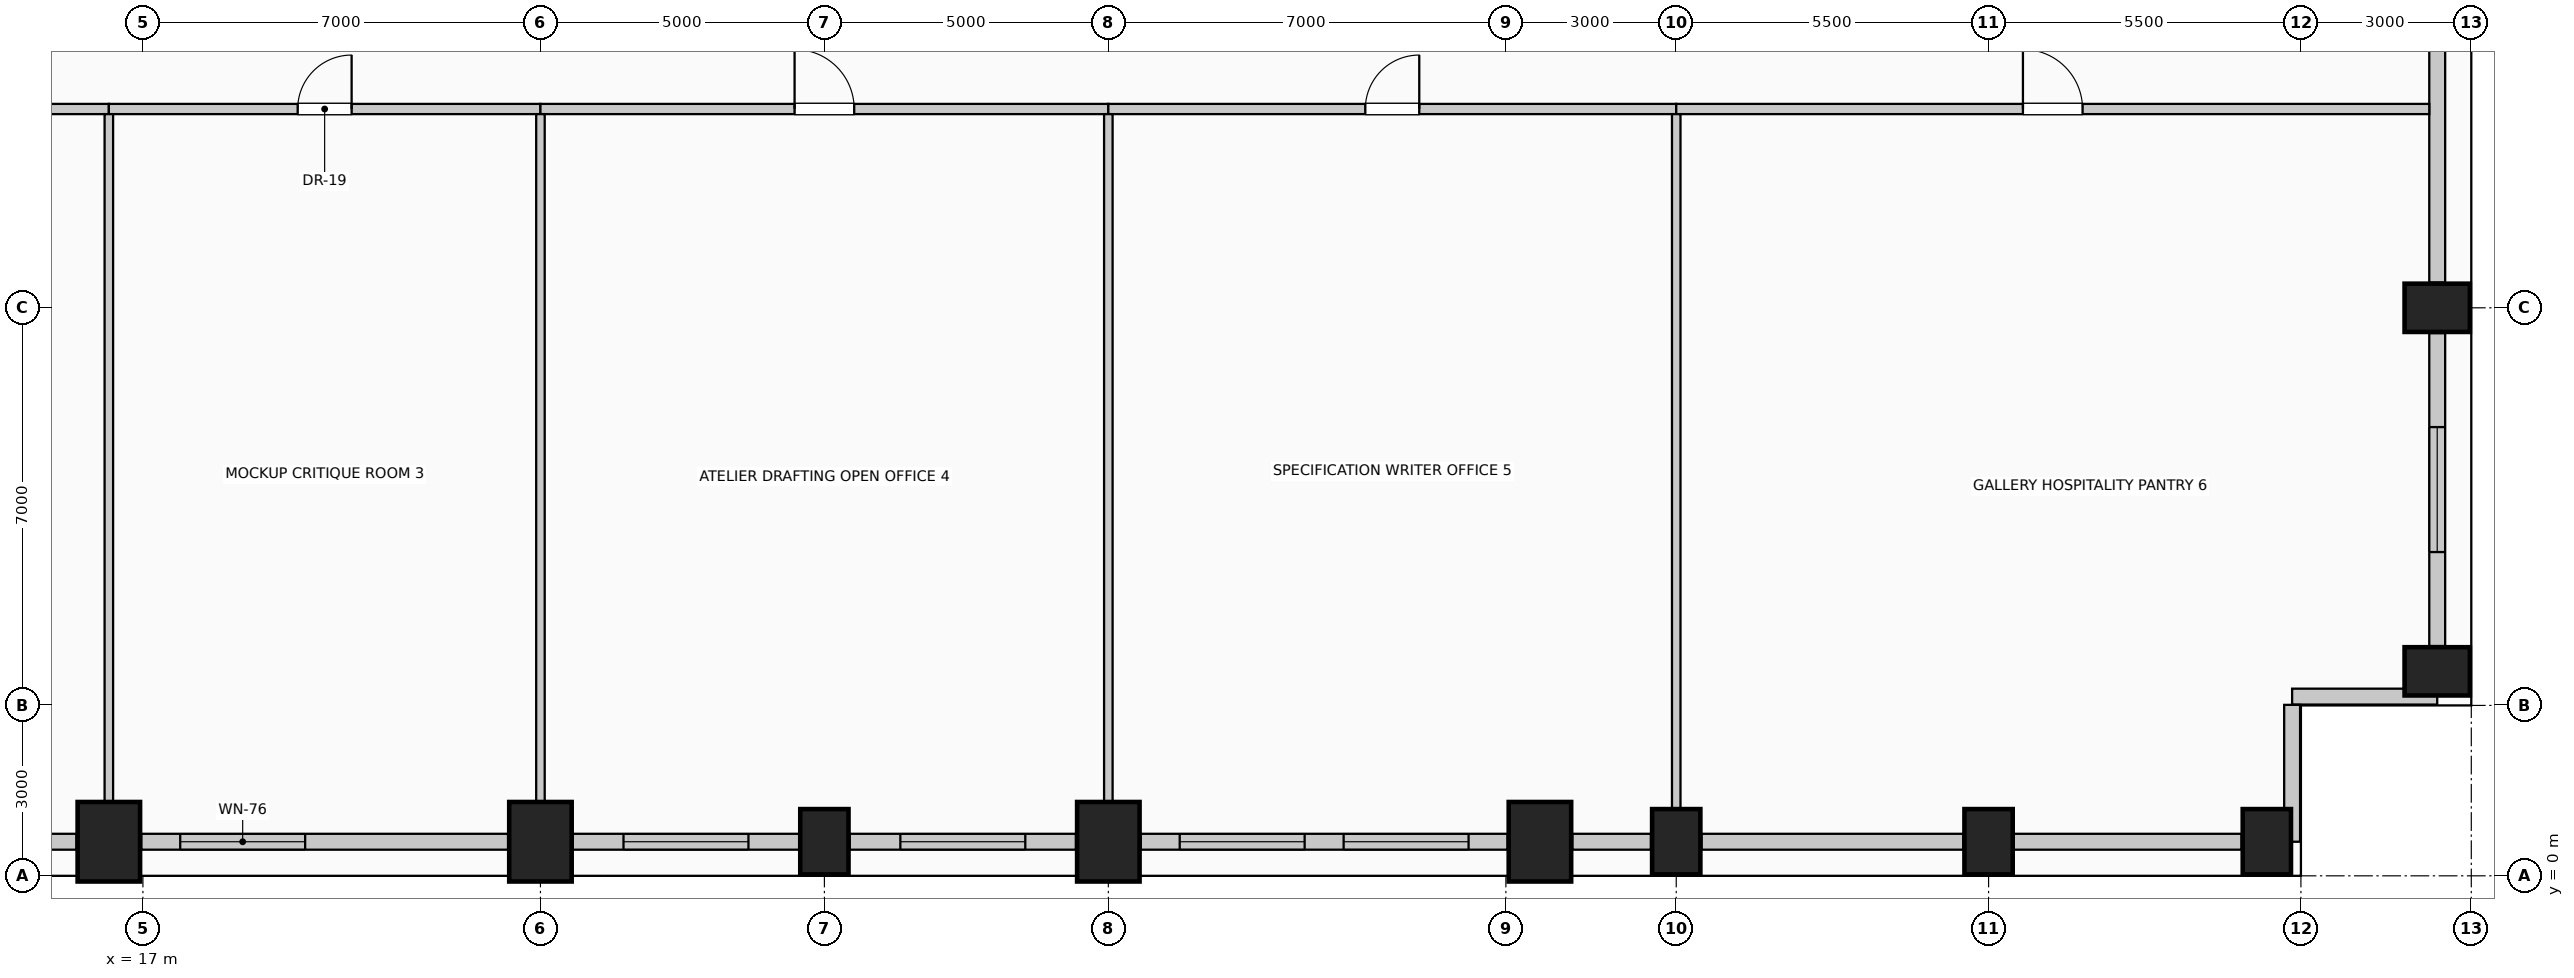
"""IFC4 building model, lengths in metres.
Left out: names, types, materials, properties, quantities, classifications, styles, units other than length and angle.
Written with IfcOpenShell. Run it as: python <this file> out.ifc"""

import sys

from ifc_helpers import new_model, si_unit, direction, frame, frame_2d, origin, origin_2d, place, context, subcontext, project, spatial, rectangle, extrude, element, fill, save


model = new_model("IFC4")
c1 = context("Model", 3, precision=1e-05, world=origin(), true_north=direction((0.0, 1.0)))
c2 = subcontext(c1, "Body", "Model", "MODEL_VIEW")
j1 = project(units=[si_unit("LENGTHUNIT", "METRE"), si_unit("PLANEANGLEUNIT", "RADIAN")], contexts=[c1])
p1 = place(None, origin())
s1 = spatial("IfcSite", under=j1, at=p1, CompositionType="ELEMENT")
p2 = place(p1, origin())
s2 = spatial("IfcBuilding", under=s1, at=p2, CompositionType="ELEMENT")
p3 = place(p2, frame((0.0, 0.0, 132.6)))
s3 = spatial("IfcBuildingStorey", under=s2, at=p3, CompositionType="ELEMENT", Elevation=132.6)
for number, where, z_axis, x_axis in (
    (1, (16.4, 0.6, 0.0), (0.0, 0.0, 1.0), (1.0, 0.0, 0.0)),
    (2, (24.0, 0.6, 0.0), (0.0, 0.0, 1.0), (1.0, 0.0, 0.0)),
):
    element("IfcColumn", number, at=place(p3, frame(where, z_axis=z_axis, x_axis=x_axis)), inside=s3, PredefinedType="COLUMN", context=c2, shape_type="SweptSolid", body=[
        extrude(rectangle(XDim=1.1, YDim=1.4, at=origin_2d()), origin(), (0.0, 0.0, 1.0), 4.0),
    ])
p4 = place(p3, frame((29.0, 0.6, 0.0), z_axis=(0.0, 0.0, 1.0), x_axis=(1.0, 0.0, 0.0)))
e3 = element("IfcColumn", 3, at=p4, inside=s3, PredefinedType="COLUMN", context=c2, shape_type="SweptSolid", body=[
    extrude(rectangle(XDim=0.85, YDim=1.15, at=origin_2d()), origin(), (0.0, 0.0, 1.0), 4.0),
])
for number, where, z_axis, x_axis in (
    (4, (34.0, 0.6, 0.0), (0.0, 0.0, 1.0), (1.0, 0.0, 0.0)),
    (5, (41.6, 0.6, 0.0), (0.0, 0.0, 1.0), (1.0, 0.0, 0.0)),
):
    element("IfcColumn", number, at=place(p3, frame(where, z_axis=z_axis, x_axis=x_axis)), inside=s3, PredefinedType="COLUMN", context=c2, shape_type="SweptSolid", body=[
        extrude(rectangle(XDim=1.1, YDim=1.4, at=origin_2d()), origin(), (0.0, 0.0, 1.0), 4.0),
    ])
for number, where, z_axis, x_axis in (
    (6, (44.0, 0.6, 0.0), (0.0, 0.0, 1.0), (1.0, 0.0, 0.0)),
    (7, (49.5, 0.6, 0.0), (0.0, 0.0, 1.0), (1.0, 0.0, 0.0)),
    (8, (54.4, 0.6, 0.0), (0.0, 0.0, 1.0), (1.0, 0.0, 0.0)),
    (9, (57.4, 3.6, 0.0), (0.0, 0.0, 1.0), (0.0, 1.0, 0.0)),
    (10, (57.4, 10.0, 0.0), (0.0, 0.0, 1.0), (0.0, 1.0, 0.0)),
):
    element("IfcColumn", number, at=place(p3, frame(where, z_axis=z_axis, x_axis=x_axis)), inside=s3, PredefinedType="COLUMN", context=c2, shape_type="SweptSolid", body=[
        extrude(rectangle(XDim=0.85, YDim=1.15, at=origin_2d()), origin(), (0.0, 0.0, 1.0), 4.0),
    ])
p5 = place(p3, frame((15.83, 0.6, 0.0), z_axis=(0.0, 0.0, 1.0), x_axis=(-1.0, 0.0, 0.0)))
e11 = element("IfcWall", 11, at=p5, inside=s3, PredefinedType="SOLIDWALL", context=c2, shape_type="SweptSolid", body=[
    extrude(rectangle(XDim=1.385, YDim=0.28, at=frame_2d((0.692, 0.0))), origin(), (0.0, 0.0, 1.0), 2.875),
])
p6 = place(p3, frame((23.43, 0.6, 0.0), z_axis=(0.0, 0.0, 1.0), x_axis=(-1.0, 0.0, 0.0)))
e12 = element("IfcWall", 12, at=p6, inside=s3, PredefinedType="SOLIDWALL", context=c2, shape_type="SweptSolid", body=[
    extrude(rectangle(XDim=6.46, YDim=0.28, at=frame_2d((3.23, 0.0))), origin(), (0.0, 0.0, 1.0), 2.875),
])
p7 = place(p6, frame((3.573, 0.0, 0.5)))
e13 = element("IfcOpeningElement", 13, at=p7, cuts=e12, PredefinedType="OPENING", context=c2, shape_type="SweptSolid", body=[
    extrude(rectangle(XDim=2.2, YDim=1.95, at=frame_2d((1.1, 0.975))), frame((0.0, 0.15, 0.0), z_axis=(0.0, -1.0, 0.0), x_axis=(1.0, 0.0, 0.0)), (0.0, 0.0, 1.0), 0.3),
])
p8 = place(p3, frame((28.555, 0.6, 0.0), z_axis=(0.0, 0.0, 1.0), x_axis=(-1.0, 0.0, 0.0)))
e14 = element("IfcWall", 14, at=p8, inside=s3, PredefinedType="SOLIDWALL", context=c2, shape_type="SweptSolid", body=[
    extrude(rectangle(XDim=3.985, YDim=0.28, at=frame_2d((1.992, 0.0))), origin(), (0.0, 0.0, 1.0), 2.875),
])
p9 = place(p8, frame((0.893, 0.0, 0.5)))
e15 = element("IfcOpeningElement", 15, at=p9, cuts=e14, PredefinedType="OPENING", context=c2, shape_type="SweptSolid", body=[
    extrude(rectangle(XDim=2.2, YDim=1.95, at=frame_2d((1.1, 0.975))), frame((0.0, 0.15, 0.0), z_axis=(0.0, -1.0, 0.0), x_axis=(1.0, 0.0, 0.0)), (0.0, 0.0, 1.0), 0.3),
])
p10 = place(p3, frame((33.43, 0.6, 0.0), z_axis=(0.0, 0.0, 1.0), x_axis=(-1.0, 0.0, 0.0)))
e16 = element("IfcWall", 16, at=p10, inside=s3, PredefinedType="SOLIDWALL", context=c2, shape_type="SweptSolid", body=[
    extrude(rectangle(XDim=3.985, YDim=0.28, at=frame_2d((1.992, 0.0))), origin(), (0.0, 0.0, 1.0), 2.875),
])
p11 = place(p10, frame((0.893, 0.0, 0.5)))
e17 = element("IfcOpeningElement", 17, at=p11, cuts=e16, PredefinedType="OPENING", context=c2, shape_type="SweptSolid", body=[
    extrude(rectangle(XDim=2.2, YDim=1.95, at=frame_2d((1.1, 0.975))), frame((0.0, 0.15, 0.0), z_axis=(0.0, -1.0, 0.0), x_axis=(1.0, 0.0, 0.0)), (0.0, 0.0, 1.0), 0.3),
])
p12 = place(p3, frame((41.03, 0.6, 0.0), z_axis=(0.0, 0.0, 1.0), x_axis=(-1.0, 0.0, 0.0)))
e18 = element("IfcWall", 18, at=p12, inside=s3, PredefinedType="SOLIDWALL", context=c2, shape_type="SweptSolid", body=[
    extrude(rectangle(XDim=6.46, YDim=0.28, at=frame_2d((3.23, 0.0))), origin(), (0.0, 0.0, 1.0), 2.875),
])
p13 = place(p12, frame((0.687, 0.0, 0.5)))
e19 = element("IfcOpeningElement", 19, at=p13, cuts=e18, PredefinedType="OPENING", context=c2, shape_type="SweptSolid", body=[
    extrude(rectangle(XDim=2.2, YDim=1.95, at=frame_2d((1.1, 0.975))), frame((0.0, 0.15, 0.0), z_axis=(0.0, -1.0, 0.0), x_axis=(1.0, 0.0, 0.0)), (0.0, 0.0, 1.0), 0.3),
])
p14 = place(p12, frame((3.573, 0.0, 0.5)))
e20 = element("IfcOpeningElement", 20, at=p14, cuts=e18, PredefinedType="OPENING", context=c2, shape_type="SweptSolid", body=[
    extrude(rectangle(XDim=2.2, YDim=1.95, at=frame_2d((1.1, 0.975))), frame((0.0, 0.15, 0.0), z_axis=(0.0, -1.0, 0.0), x_axis=(1.0, 0.0, 0.0)), (0.0, 0.0, 1.0), 0.3),
])
p15 = place(p3, frame((43.555, 0.6, 0.0), z_axis=(0.0, 0.0, 1.0), x_axis=(-1.0, 0.0, 0.0)))
e21 = element("IfcWall", 21, at=p15, inside=s3, PredefinedType="SOLIDWALL", context=c2, shape_type="SweptSolid", body=[
    extrude(rectangle(XDim=1.385, YDim=0.28, at=frame_2d((0.692, 0.0))), origin(), (0.0, 0.0, 1.0), 2.875),
])
p16 = place(p3, frame((49.055, 0.6, 0.0), z_axis=(0.0, 0.0, 1.0), x_axis=(-1.0, 0.0, 0.0)))
e22 = element("IfcWall", 22, at=p16, inside=s3, PredefinedType="SOLIDWALL", context=c2, shape_type="SweptSolid", body=[
    extrude(rectangle(XDim=4.61, YDim=0.28, at=frame_2d((2.305, 0.0))), origin(), (0.0, 0.0, 1.0), 2.875),
])
p17 = place(p3, frame((53.955, 0.6, 0.0), z_axis=(0.0, 0.0, 1.0), x_axis=(-1.0, 0.0, 0.0)))
e23 = element("IfcWall", 23, at=p17, inside=s3, PredefinedType="SOLIDWALL", context=c2, shape_type="SweptSolid", body=[
    extrude(rectangle(XDim=4.01, YDim=0.28, at=frame_2d((2.005, 0.0))), origin(), (0.0, 0.0, 1.0), 2.875),
])
p18 = place(p3, frame((57.4, 9.555, 0.0), z_axis=(0.0, 0.0, 1.0), x_axis=(0.0, -1.0, 0.0)))
e24 = element("IfcWall", 24, at=p18, inside=s3, PredefinedType="SOLIDWALL", context=c2, shape_type="SweptSolid", body=[
    extrude(rectangle(XDim=5.51, YDim=0.28, at=frame_2d((2.755, 0.0))), origin(), (0.0, 0.0, 1.0), 2.875),
])
p19 = place(p18, frame((1.655, 0.0, 0.5)))
e25 = element("IfcOpeningElement", 25, at=p19, cuts=e24, PredefinedType="OPENING", context=c2, shape_type="SweptSolid", body=[
    extrude(rectangle(XDim=2.2, YDim=1.95, at=frame_2d((1.1, 0.975))), frame((0.0, 0.15, 0.0), z_axis=(0.0, -1.0, 0.0), x_axis=(1.0, 0.0, 0.0)), (0.0, 0.0, 1.0), 0.3),
])
p20 = place(p3, frame((57.4, 17.555, 0.0), z_axis=(0.0, 0.0, 1.0), x_axis=(0.0, -1.0, 0.0)))
e26 = element("IfcWall", 26, at=p20, inside=s3, PredefinedType="SOLIDWALL", context=c2, shape_type="SweptSolid", body=[
    extrude(rectangle(XDim=7.11, YDim=0.28, at=frame_2d((3.555, 0.0))), origin(), (0.0, 0.0, 1.0), 2.875),
])
p21 = place(p3, frame((57.4, 3.155, 0.0), z_axis=(0.0, 0.0, 1.0), x_axis=(-1.0, 0.0, 0.0)))
e27 = element("IfcWall", 27, at=p21, inside=s3, PredefinedType="SOLIDWALL", context=c2, shape_type="SweptSolid", body=[
    extrude(rectangle(XDim=2.555, YDim=0.28, at=frame_2d((1.277, 0.0))), origin(), (0.0, 0.0, 1.0), 3.725),
])
p22 = place(p3, frame((54.845, 3.01, 0.0), z_axis=(0.0, 0.0, 1.0), x_axis=(0.0, -1.0, 0.0)))
e28 = element("IfcWall", 28, at=p22, inside=s3, PredefinedType="SOLIDWALL", context=c2, shape_type="SweptSolid", body=[
    extrude(rectangle(XDim=2.41, YDim=0.28, at=frame_2d((1.205, 0.0))), origin(), (0.0, 0.0, 1.0), 3.725),
])
p23 = place(p3, frame((9.24, 13.5, 0.0), z_axis=(0.0, 0.0, 1.0), x_axis=(1.0, 0.0, 0.0)))
e29 = element("IfcWall", 29, at=p23, inside=s3, PredefinedType="PARTITIONING", context=c2, shape_type="SweptSolid", body=[
    extrude(rectangle(XDim=7.16, YDim=0.18, at=frame_2d((3.58, 0.0))), origin(), (0.0, 0.0, 1.0), 3.725),
])
p24 = place(p23, frame((3.055, 0.0, 0.0)))
e30 = element("IfcOpeningElement", 30, at=p24, cuts=e29, PredefinedType="OPENING", context=c2, shape_type="SweptSolid", body=[
    extrude(rectangle(XDim=1.05, YDim=2.15, at=frame_2d((0.525, 1.075))), frame((0.0, 0.1, 0.0), z_axis=(0.0, -1.0, 0.0), x_axis=(1.0, 0.0, 0.0)), (0.0, 0.0, 1.0), 0.2),
])
p25 = place(p3, frame((16.4, 13.5, 0.0), z_axis=(0.0, 0.0, 1.0), x_axis=(1.0, 0.0, 0.0)))
e31 = element("IfcWall", 31, at=p25, inside=s3, PredefinedType="PARTITIONING", context=c2, shape_type="SweptSolid", body=[
    extrude(rectangle(XDim=7.6, YDim=0.18, at=frame_2d((3.8, 0.0))), origin(), (0.0, 0.0, 1.0), 3.725),
])
p26 = place(p25, frame((3.325, 0.0, 0.0)))
e32 = element("IfcOpeningElement", 32, at=p26, cuts=e31, PredefinedType="OPENING", context=c2, shape_type="SweptSolid", body=[
    extrude(rectangle(XDim=0.95, YDim=2.15, at=frame_2d((0.475, 1.075))), frame((0.0, 0.1, 0.0), z_axis=(0.0, -1.0, 0.0), x_axis=(1.0, 0.0, 0.0)), (0.0, 0.0, 1.0), 0.2),
])
p27 = place(p3, frame((24.0, 13.5, 0.0), z_axis=(0.0, 0.0, 1.0), x_axis=(1.0, 0.0, 0.0)))
e33 = element("IfcWall", 33, at=p27, inside=s3, PredefinedType="PARTITIONING", context=c2, shape_type="SweptSolid", body=[
    extrude(rectangle(XDim=10.0, YDim=0.18, at=frame_2d((5.0, 0.0))), origin(), (0.0, 0.0, 1.0), 3.725),
])
p28 = place(p27, frame((4.475, 0.0, 0.0)))
e34 = element("IfcOpeningElement", 34, at=p28, cuts=e33, PredefinedType="OPENING", context=c2, shape_type="SweptSolid", body=[
    extrude(rectangle(XDim=1.05, YDim=2.15, at=frame_2d((0.525, 1.075))), frame((0.0, 0.1, 0.0), z_axis=(0.0, -1.0, 0.0), x_axis=(1.0, 0.0, 0.0)), (0.0, 0.0, 1.0), 0.2),
])
p29 = place(p3, frame((34.0, 13.5, 0.0), z_axis=(0.0, 0.0, 1.0), x_axis=(1.0, 0.0, 0.0)))
e35 = element("IfcWall", 35, at=p29, inside=s3, PredefinedType="PARTITIONING", context=c2, shape_type="SweptSolid", body=[
    extrude(rectangle(XDim=10.0, YDim=0.18, at=frame_2d((5.0, 0.0))), origin(), (0.0, 0.0, 1.0), 3.725),
])
p30 = place(p29, frame((4.525, 0.0, 0.0)))
e36 = element("IfcOpeningElement", 36, at=p30, cuts=e35, PredefinedType="OPENING", context=c2, shape_type="SweptSolid", body=[
    extrude(rectangle(XDim=0.95, YDim=2.15, at=frame_2d((0.475, 1.075))), frame((0.0, 0.1, 0.0), z_axis=(0.0, -1.0, 0.0), x_axis=(1.0, 0.0, 0.0)), (0.0, 0.0, 1.0), 0.2),
])
p31 = place(p3, frame((44.0, 13.5, 0.0), z_axis=(0.0, 0.0, 1.0), x_axis=(1.0, 0.0, 0.0)))
e37 = element("IfcWall", 37, at=p31, inside=s3, PredefinedType="PARTITIONING", context=c2, shape_type="SweptSolid", body=[
    extrude(rectangle(XDim=13.26, YDim=0.18, at=frame_2d((6.63, 0.0))), origin(), (0.0, 0.0, 1.0), 3.725),
])
p32 = place(p31, frame((6.105, 0.0, 0.0)))
e38 = element("IfcOpeningElement", 38, at=p32, cuts=e37, PredefinedType="OPENING", context=c2, shape_type="SweptSolid", body=[
    extrude(rectangle(XDim=1.05, YDim=2.15, at=frame_2d((0.525, 1.075))), frame((0.0, 0.1, 0.0), z_axis=(0.0, -1.0, 0.0), x_axis=(1.0, 0.0, 0.0)), (0.0, 0.0, 1.0), 0.2),
])
p33 = place(p3, frame((16.4, 1.3, 0.0), z_axis=(0.0, 0.0, 1.0), x_axis=(0.0, 1.0, 0.0)))
e39 = element("IfcWall", 39, at=p33, inside=s3, PredefinedType="PARTITIONING", context=c2, shape_type="SweptSolid", body=[
    extrude(rectangle(XDim=12.11, YDim=0.15, at=frame_2d((6.055, 0.0))), origin(), (0.0, 0.0, 1.0), 3.07),
])
for number, where, z_axis, x_axis in (
    (40, (24.0, 1.3, 0.0), (0.0, 0.0, 1.0), (0.0, 1.0, 0.0)),
    (41, (34.0, 1.3, 0.0), (0.0, 0.0, 1.0), (0.0, 1.0, 0.0)),
):
    element("IfcWall", number, at=place(p3, frame(where, z_axis=z_axis, x_axis=x_axis)), inside=s3, PredefinedType="PARTITIONING", context=c2, shape_type="SweptSolid", body=[
        extrude(rectangle(XDim=12.11, YDim=0.15, at=frame_2d((6.055, 0.0))), origin(), (0.0, 0.0, 1.0), 3.725),
    ])
p34 = place(p3, frame((44.0, 1.175, 0.0), z_axis=(0.0, 0.0, 1.0), x_axis=(0.0, 1.0, 0.0)))
e42 = element("IfcWall", 42, at=p34, inside=s3, PredefinedType="PARTITIONING", context=c2, shape_type="SweptSolid", body=[
    extrude(rectangle(XDim=12.235, YDim=0.15, at=frame_2d((6.117, 0.0))), origin(), (0.0, 0.0, 1.0), 3.725),
])
p35 = place(p7, origin())
e43 = element("IfcWindow", 43, at=p35, inside=s3, PartitioningType="SINGLE_PANEL", PredefinedType="WINDOW", context=c2, shape_type="SweptSolid", body=[
    extrude(rectangle(XDim=2.2, YDim=1.95, at=frame_2d((1.1, 0.975))), frame((0.0, 0.03, 0.0), z_axis=(0.0, -1.0, 0.0), x_axis=(1.0, 0.0, 0.0)), (0.0, 0.0, 1.0), 0.06),
])
fill(e13, e43)
p36 = place(p9, origin())
e44 = element("IfcWindow", 44, at=p36, inside=s3, PartitioningType="SINGLE_PANEL", PredefinedType="WINDOW", context=c2, shape_type="SweptSolid", body=[
    extrude(rectangle(XDim=2.2, YDim=1.95, at=frame_2d((1.1, 0.975))), frame((0.0, 0.03, 0.0), z_axis=(0.0, -1.0, 0.0), x_axis=(1.0, 0.0, 0.0)), (0.0, 0.0, 1.0), 0.06),
])
fill(e15, e44)
p37 = place(p11, origin())
e45 = element("IfcWindow", 45, at=p37, inside=s3, PartitioningType="SINGLE_PANEL", PredefinedType="WINDOW", context=c2, shape_type="SweptSolid", body=[
    extrude(rectangle(XDim=2.2, YDim=1.95, at=frame_2d((1.1, 0.975))), frame((0.0, 0.03, 0.0), z_axis=(0.0, -1.0, 0.0), x_axis=(1.0, 0.0, 0.0)), (0.0, 0.0, 1.0), 0.06),
])
fill(e17, e45)
p38 = place(p13, origin())
e46 = element("IfcWindow", 46, at=p38, inside=s3, PartitioningType="SINGLE_PANEL", PredefinedType="WINDOW", context=c2, shape_type="SweptSolid", body=[
    extrude(rectangle(XDim=2.2, YDim=1.95, at=frame_2d((1.1, 0.975))), frame((0.0, 0.03, 0.0), z_axis=(0.0, -1.0, 0.0), x_axis=(1.0, 0.0, 0.0)), (0.0, 0.0, 1.0), 0.06),
])
fill(e19, e46)
p39 = place(p14, origin())
e47 = element("IfcWindow", 47, at=p39, inside=s3, PartitioningType="SINGLE_PANEL", PredefinedType="WINDOW", context=c2, shape_type="SweptSolid", body=[
    extrude(rectangle(XDim=2.2, YDim=1.95, at=frame_2d((1.1, 0.975))), frame((0.0, 0.03, 0.0), z_axis=(0.0, -1.0, 0.0), x_axis=(1.0, 0.0, 0.0)), (0.0, 0.0, 1.0), 0.06),
])
fill(e20, e47)
p40 = place(p19, origin())
e48 = element("IfcWindow", 48, at=p40, inside=s3, PartitioningType="SINGLE_PANEL", PredefinedType="WINDOW", context=c2, shape_type="SweptSolid", body=[
    extrude(rectangle(XDim=2.2, YDim=1.95, at=frame_2d((1.1, 0.975))), frame((0.0, 0.03, 0.0), z_axis=(0.0, -1.0, 0.0), x_axis=(1.0, 0.0, 0.0)), (0.0, 0.0, 1.0), 0.06),
])
fill(e25, e48)
p41 = place(p26, origin())
e49 = element("IfcDoor", 49, at=p41, inside=s3, OperationType="SINGLE_SWING_RIGHT", PredefinedType="DOOR", context=c2, shape_type="SweptSolid", body=[
    extrude(rectangle(XDim=0.95, YDim=2.15, at=frame_2d((0.475, 1.075))), frame((0.0, 0.025, 0.0), z_axis=(0.0, -1.0, 0.0), x_axis=(1.0, 0.0, 0.0)), (0.0, 0.0, 1.0), 0.05),
])
fill(e32, e49)
p42 = place(p28, origin())
e50 = element("IfcDoor", 50, at=p42, inside=s3, OperationType="SINGLE_SWING_LEFT", PredefinedType="DOOR", context=c2, shape_type="SweptSolid", body=[
    extrude(rectangle(XDim=1.05, YDim=2.15, at=frame_2d((0.525, 1.075))), frame((0.0, 0.025, 0.0), z_axis=(0.0, -1.0, 0.0), x_axis=(1.0, 0.0, 0.0)), (0.0, 0.0, 1.0), 0.05),
])
fill(e34, e50)
p43 = place(p30, origin())
e51 = element("IfcDoor", 51, at=p43, inside=s3, OperationType="SINGLE_SWING_RIGHT", PredefinedType="DOOR", context=c2, shape_type="SweptSolid", body=[
    extrude(rectangle(XDim=0.95, YDim=2.15, at=frame_2d((0.475, 1.075))), frame((0.0, 0.025, 0.0), z_axis=(0.0, -1.0, 0.0), x_axis=(1.0, 0.0, 0.0)), (0.0, 0.0, 1.0), 0.05),
])
fill(e36, e51)
p44 = place(p32, origin())
e52 = element("IfcDoor", 52, at=p44, inside=s3, OperationType="SINGLE_SWING_LEFT", PredefinedType="DOOR", context=c2, shape_type="SweptSolid", body=[
    extrude(rectangle(XDim=1.05, YDim=2.15, at=frame_2d((0.525, 1.075))), frame((0.0, 0.025, 0.0), z_axis=(0.0, -1.0, 0.0), x_axis=(1.0, 0.0, 0.0)), (0.0, 0.0, 1.0), 0.05),
])
fill(e38, e52)
save(model, sys.argv[1])
